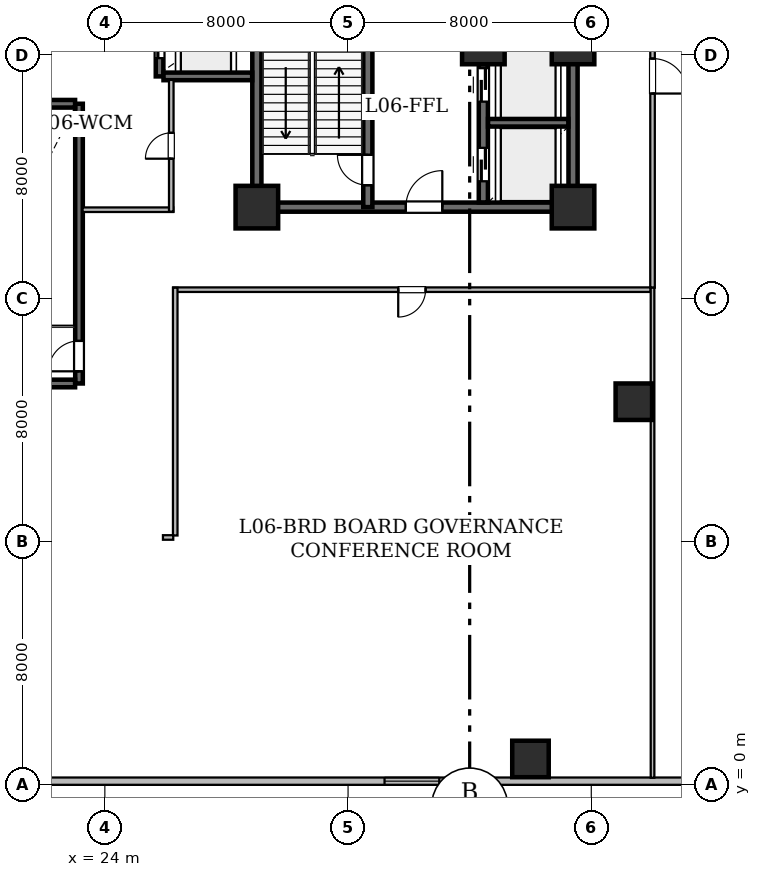
"""IFC4 building model, lengths in metres.
Left out: names, types, materials, properties, quantities, classifications, styles, units other than length and angle.
Written with IfcOpenShell. Run it as: python <this file> out.ifc"""

import sys

from ifc_helpers import new_model, si_unit, direction, frame, frame_2d, origin, origin_2d, place, context, subcontext, project, spatial, rectangle, hollow_rectangle, extrude, element, fill, save


model = new_model("IFC4")
c1 = context("Model", 3, precision=1e-05, world=origin(), true_north=direction((0.0, 1.0)))
c2 = subcontext(c1, "Body", "Model", "MODEL_VIEW")
j1 = project(units=[si_unit("LENGTHUNIT", "METRE"), si_unit("PLANEANGLEUNIT", "RADIAN")], contexts=[c1])
p1 = place(None, origin())
s1 = spatial("IfcSite", under=j1, at=p1, CompositionType="ELEMENT")
p2 = place(p1, origin())
s2 = spatial("IfcBuilding", under=s1, at=p2, CompositionType="ELEMENT")
p3 = place(p2, frame((0.0, 0.0, 28.8)))
s3 = spatial("IfcBuildingStorey", under=s2, at=p3, CompositionType="ELEMENT", Elevation=28.8)
for number, where, z_axis, x_axis in (
    (1, (29.0, 19.0, 0.0), (0.0, 0.0, 1.0), (1.0, 0.0, 0.0)),
    (2, (39.4, 19.0, 0.0), (0.0, 0.0, 1.0), (1.0, 0.0, 0.0)),
    (3, (36.45, 24.4, 0.0), (0.0, 0.0, 1.0), (1.0, 0.0, 0.0)),
    (4, (39.4, 24.4, 0.0), (0.0, 0.0, 1.0), (1.0, 0.0, 0.0)),
):
    element("IfcColumn", number, at=place(p3, frame(where, z_axis=z_axis, x_axis=x_axis)), inside=s3, PredefinedType="COLUMN", context=c2, shape_type="SweptSolid", body=[
        extrude(hollow_rectangle(XDim=1.4, YDim=1.4, WallThickness=0.07, at=origin_2d()), origin(), (0.0, 0.0, 1.0), 4.5),
    ])
for number, where, z_axis, x_axis in (
    (5, (38.0, 0.85, 0.0), (0.0, 0.0, 1.0), (1.0, 0.0, 0.0)),
    (6, (41.4, 12.6, 0.0), (0.0, 0.0, 1.0), (1.0, 0.0, 0.0)),
):
    element("IfcColumn", number, at=place(p3, frame(where, z_axis=z_axis, x_axis=x_axis)), inside=s3, PredefinedType="COLUMN", context=c2, shape_type="SweptSolid", body=[
        extrude(hollow_rectangle(XDim=1.2, YDim=1.2, WallThickness=0.06, at=origin_2d()), origin(), (0.0, 0.0, 1.0), 4.475),
    ])
p4 = place(p3, frame((50.275, 0.12, 0.0), z_axis=(0.0, 0.0, 1.0), x_axis=(-1.0, 0.0, 0.0)))
e7 = element("IfcWall", 7, at=p4, inside=s3, PredefinedType="STANDARD", context=c2, shape_type="SweptSolid", body=[
    extrude(rectangle(XDim=44.55, YDim=0.24, at=frame_2d((22.275, 0.0))), origin(), (0.0, 0.0, 1.0), 4.08),
])
p5 = place(p4, frame((15.275, 0.0, 0.85)))
e8 = element("IfcOpeningElement", 8, at=p5, cuts=e7, PredefinedType="OPENING", context=c2, shape_type="SweptSolid", body=[
    extrude(rectangle(XDim=1.8, YDim=0.92, at=frame_2d((0.9, 0.46))), frame((0.0, 0.13, 0.0), z_axis=(0.0, -1.0, 0.0), x_axis=(1.0, 0.0, 0.0)), (0.0, 0.0, 1.0), 0.26),
])
p6 = place(p3, frame((29.0, 19.0, 0.0), z_axis=(0.0, 0.0, 1.0), x_axis=(0.0, 1.0, 0.0)))
e9 = element("IfcWall", 9, at=p6, inside=s3, PredefinedType="SHEAR", context=c2, shape_type="SweptSolid", body=[
    extrude(rectangle(XDim=9.0, YDim=0.3, at=frame_2d((4.5, 0.0))), origin(), (0.0, 0.0, 1.0), 4.08),
])
p7 = place(p3, frame((29.0, 19.0, 0.0), z_axis=(0.0, 0.0, 1.0), x_axis=(1.0, 0.0, 0.0)))
e10 = element("IfcWall", 10, at=p7, inside=s3, PredefinedType="SHEAR", context=c2, shape_type="SweptSolid", body=[
    extrude(rectangle(XDim=10.4, YDim=0.3, at=frame_2d((5.2, 0.0))), origin(), (0.0, 0.0, 1.0), 4.08),
])
p8 = place(p7, frame((4.9, 0.0, 0.0)))
e11 = element("IfcOpeningElement", 11, at=p8, cuts=e10, PredefinedType="OPENING", context=c2, shape_type="SweptSolid", body=[
    extrude(rectangle(XDim=1.2, YDim=2.15, at=frame_2d((0.6, 1.075))), frame((0.0, 0.16, 0.0), z_axis=(0.0, -1.0, 0.0), x_axis=(1.0, 0.0, 0.0)), (0.0, 0.0, 1.0), 0.32),
])
p9 = place(p3, frame((39.4, 19.0, 0.0), z_axis=(0.0, 0.0, 1.0), x_axis=(0.0, 1.0, 0.0)))
e12 = element("IfcWall", 12, at=p9, inside=s3, PredefinedType="SHEAR", context=c2, shape_type="SweptSolid", body=[
    extrude(rectangle(XDim=5.4, YDim=0.3, at=frame_2d((2.7, 0.0))), origin(), (0.0, 0.0, 1.0), 4.08),
])
p10 = place(p3, frame((32.65, 19.0, 0.0), z_axis=(0.0, 0.0, 1.0), x_axis=(0.0, 1.0, 0.0)))
e13 = element("IfcWall", 13, at=p10, inside=s3, PredefinedType="SHEAR", context=c2, shape_type="SweptSolid", body=[
    extrude(rectangle(XDim=9.0, YDim=0.3, at=frame_2d((4.5, 0.0))), origin(), (0.0, 0.0, 1.0), 4.08),
])
p11 = place(p10, frame((0.72, 0.0, 0.0)))
e14 = element("IfcOpeningElement", 14, at=p11, cuts=e13, PredefinedType="OPENING", context=c2, shape_type="SweptSolid", body=[
    extrude(rectangle(XDim=1.0, YDim=2.15, at=frame_2d((0.5, 1.075))), frame((0.0, 0.16, 0.0), z_axis=(0.0, -1.0, 0.0), x_axis=(1.0, 0.0, 0.0)), (0.0, 0.0, 1.0), 0.32),
])
p12 = place(p3, frame((36.45, 19.154, 0.0), z_axis=(0.0, 0.0, 1.0), x_axis=(0.0, 1.0, 0.0)))
e15 = element("IfcWall", 15, at=p12, inside=s3, PredefinedType="SHEAR", context=c2, shape_type="SweptSolid", body=[
    extrude(rectangle(XDim=4.546, YDim=0.3, at=frame_2d((2.273, 0.0))), origin(), (0.0, 0.0, 1.0), 4.08),
])
p13 = place(p12, frame((0.696, 0.0, 0.0)))
e16 = element("IfcOpeningElement", 16, at=p13, cuts=e15, PredefinedType="OPENING", context=c2, shape_type="SweptSolid", body=[
    extrude(rectangle(XDim=1.1, YDim=2.15, at=frame_2d((0.55, 1.075))), frame((0.0, 0.16, 0.0), z_axis=(0.0, -1.0, 0.0), x_axis=(1.0, 0.0, 0.0)), (0.0, 0.0, 1.0), 0.32),
])
p14 = place(p12, frame((3.316, 0.0, 0.0)))
e17 = element("IfcOpeningElement", 17, at=p14, cuts=e15, PredefinedType="OPENING", context=c2, shape_type="SweptSolid", body=[
    extrude(rectangle(XDim=1.1, YDim=2.15, at=frame_2d((0.55, 1.075))), frame((0.0, 0.16, 0.0), z_axis=(0.0, -1.0, 0.0), x_axis=(1.0, 0.0, 0.0)), (0.0, 0.0, 1.0), 0.32),
])
p15 = place(p3, frame((36.604, 21.775, 0.0), z_axis=(0.0, 0.0, 1.0), x_axis=(1.0, 0.0, 0.0)))
e18 = element("IfcWall", 18, at=p15, inside=s3, PredefinedType="SHEAR", context=c2, shape_type="SweptSolid", body=[
    extrude(rectangle(XDim=2.642, YDim=0.25, at=frame_2d((1.321, 0.0))), origin(), (0.0, 0.0, 1.0), 4.08),
])
p16 = place(p3, frame((23.15, 13.2, 0.0), z_axis=(0.0, 0.0, 1.0), x_axis=(0.0, 1.0, 0.0)))
e19 = element("IfcWall", 19, at=p16, inside=s3, PredefinedType="SHEAR", context=c2, shape_type="SweptSolid", body=[
    extrude(rectangle(XDim=9.2, YDim=0.25, at=frame_2d((4.6, 0.0))), origin(), (0.0, 0.0, 1.0), 4.08),
])
p17 = place(p16, frame((0.4, 0.0, 0.0)))
e20 = element("IfcOpeningElement", 20, at=p17, cuts=e19, PredefinedType="OPENING", context=c2, shape_type="SweptSolid", body=[
    extrude(rectangle(XDim=1.0, YDim=2.15, at=frame_2d((0.5, 1.075))), frame((0.0, 0.135, 0.0), z_axis=(0.0, -1.0, 0.0), x_axis=(1.0, 0.0, 0.0)), (0.0, 0.0, 1.0), 0.27),
])
for number, where, z_axis, x_axis in (
    (21, (19.329, 13.2, 0.0), (0.0, 0.0, 1.0), (1.0, 0.0, 0.0)),
    (22, (19.329, 22.4, 0.0), (0.0, 0.0, 1.0), (1.0, 0.0, 0.0)),
):
    element("IfcWall", number, at=place(p3, frame(where, z_axis=z_axis, x_axis=x_axis)), inside=s3, PredefinedType="SHEAR", context=c2, shape_type="SweptSolid", body=[
        extrude(rectangle(XDim=3.692, YDim=0.25, at=frame_2d((1.846, 0.0))), origin(), (0.0, 0.0, 1.0), 4.08),
    ])
p18 = place(p3, frame((25.8, 23.3, 0.0), z_axis=(0.0, 0.0, 1.0), x_axis=(0.0, 1.0, 0.0)))
e23 = element("IfcWall", 23, at=p18, inside=s3, PredefinedType="SHEAR", context=c2, shape_type="SweptSolid", body=[
    extrude(rectangle(XDim=4.55, YDim=0.25, at=frame_2d((2.275, 0.0))), origin(), (0.0, 0.0, 1.0), 4.08),
])
p19 = place(p18, frame((0.6, 0.0, 0.0)))
e24 = element("IfcOpeningElement", 24, at=p19, cuts=e23, PredefinedType="OPENING", context=c2, shape_type="SweptSolid", body=[
    extrude(rectangle(XDim=1.1, YDim=2.15, at=frame_2d((0.55, 1.075))), frame((0.0, 0.135, 0.0), z_axis=(0.0, -1.0, 0.0), x_axis=(1.0, 0.0, 0.0)), (0.0, 0.0, 1.0), 0.27),
])
p20 = place(p18, frame((2.85, 0.0, 0.0)))
e25 = element("IfcOpeningElement", 25, at=p20, cuts=e23, PredefinedType="OPENING", context=c2, shape_type="SweptSolid", body=[
    extrude(rectangle(XDim=1.1, YDim=2.15, at=frame_2d((0.55, 1.075))), frame((0.0, 0.135, 0.0), z_axis=(0.0, -1.0, 0.0), x_axis=(1.0, 0.0, 0.0)), (0.0, 0.0, 1.0), 0.27),
])
p21 = place(p3, frame((25.929, 23.3, 0.0), z_axis=(0.0, 0.0, 1.0), x_axis=(1.0, 0.0, 0.0)))
e26 = element("IfcWall", 26, at=p21, inside=s3, PredefinedType="SHEAR", context=c2, shape_type="SweptSolid", body=[
    extrude(rectangle(XDim=2.917, YDim=0.25, at=frame_2d((1.458, 0.0))), origin(), (0.0, 0.0, 1.0), 4.08),
])
p22 = place(p3, frame((23.267, 18.915, 0.0), z_axis=(0.0, 0.0, 1.0), x_axis=(1.0, 0.0, 0.0)))
e27 = element("IfcWall", 27, at=p22, inside=s3, PredefinedType="STANDARD", context=c2, shape_type="SweptSolid", body=[
    extrude(rectangle(XDim=2.983, YDim=0.15, at=frame_2d((1.491, 0.0))), origin(), (0.0, 0.0, 1.0), 4.08),
])
p23 = place(p3, frame((26.185, 18.852, 0.0), z_axis=(0.0, 0.0, 1.0), x_axis=(0.0, 1.0, 0.0)))
e28 = element("IfcWall", 28, at=p23, inside=s3, PredefinedType="STANDARD", context=c2, shape_type="SweptSolid", body=[
    extrude(rectangle(XDim=4.331, YDim=0.15, at=frame_2d((2.166, 0.0))), origin(), (0.0, 0.0, 1.0), 4.08),
])
p24 = place(p23, frame((1.741, 0.0, 0.0)))
e29 = element("IfcOpeningElement", 29, at=p24, cuts=e28, PredefinedType="OPENING", context=c2, shape_type="SweptSolid", body=[
    extrude(rectangle(XDim=0.85, YDim=2.1, at=frame_2d((0.425, 1.05))), frame((0.0, 0.085, 0.0), z_axis=(0.0, -1.0, 0.0), x_axis=(1.0, 0.0, 0.0)), (0.0, 0.0, 1.0), 0.17),
])
p25 = place(p3, frame((42.015, 30.314, 0.0), z_axis=(0.0, 0.0, 1.0), x_axis=(0.0, -1.0, 0.0)))
e30 = element("IfcWall", 30, at=p25, inside=s3, PredefinedType="STANDARD", context=c2, shape_type="SweptSolid", body=[
    extrude(rectangle(XDim=13.964, YDim=0.15, at=frame_2d((6.982, 0.0))), origin(), (0.0, 0.0, 1.0), 2.67),
])
p26 = place(p25, frame((6.428, 0.0, 0.0)))
e31 = element("IfcOpeningElement", 31, at=p26, cuts=e30, PredefinedType="OPENING", context=c2, shape_type="SweptSolid", body=[
    extrude(rectangle(XDim=1.15, YDim=2.2, at=frame_2d((0.575, 1.1))), frame((0.0, 0.085, 0.0), z_axis=(0.0, -1.0, 0.0), x_axis=(1.0, 0.0, 0.0)), (0.0, 0.0, 1.0), 0.17),
])
p27 = place(p3, frame((41.95, 16.285, 0.0), z_axis=(0.0, 0.0, 1.0), x_axis=(-1.0, 0.0, 0.0)))
e32 = element("IfcWall", 32, at=p27, inside=s3, PredefinedType="STANDARD", context=c2, shape_type="SweptSolid", body=[
    extrude(rectangle(XDim=15.7, YDim=0.15, at=frame_2d((7.85, 0.0))), origin(), (0.0, 0.0, 1.0), 2.67),
])
p28 = place(p27, frame((7.4, 0.0, 0.0)))
e33 = element("IfcOpeningElement", 33, at=p28, cuts=e32, PredefinedType="OPENING", context=c2, shape_type="SweptSolid", body=[
    extrude(rectangle(XDim=0.9, YDim=2.1, at=frame_2d((0.45, 1.05))), frame((0.0, 0.085, 0.0), z_axis=(0.0, -1.0, 0.0), x_axis=(1.0, 0.0, 0.0)), (0.0, 0.0, 1.0), 0.17),
])
p29 = place(p3, frame((26.315, 16.35, 0.0), z_axis=(0.0, 0.0, 1.0), x_axis=(0.0, -1.0, 0.0)))
e34 = element("IfcWall", 34, at=p29, inside=s3, PredefinedType="STANDARD", context=c2, shape_type="SweptSolid", body=[
    extrude(rectangle(XDim=8.15, YDim=0.15, at=frame_2d((4.075, 0.0))), origin(), (0.0, 0.0, 1.0), 2.67),
])
p30 = place(p3, frame((26.25, 8.135, 0.0), z_axis=(0.0, 0.0, 1.0), x_axis=(-1.0, 0.0, 0.0)))
e35 = element("IfcWall", 35, at=p30, inside=s3, PredefinedType="STANDARD", context=c2, shape_type="SweptSolid", body=[
    extrude(rectangle(XDim=0.339, YDim=0.15, at=frame_2d((0.169, 0.0))), origin(), (0.0, 0.0, 1.0), 4.08),
])
p31 = place(p3, frame((42.015, 0.232, 0.0), z_axis=(0.0, 0.0, 1.0), x_axis=(0.0, 1.0, 0.0)))
e36 = element("IfcWall", 36, at=p31, inside=s3, PredefinedType="PARTITIONING", context=c2, shape_type="SweptSolid", body=[
    extrude(rectangle(XDim=16.118, YDim=0.12, at=frame_2d((8.059, 0.0))), origin(), (0.0, 0.0, 1.0), 2.67),
])
p32 = place(p5, origin())
e37 = element("IfcWindow", 37, at=p32, inside=s3, PartitioningType="SINGLE_PANEL", PredefinedType="WINDOW", context=c2, shape_type="SweptSolid", body=[
    extrude(rectangle(XDim=1.8, YDim=0.92, at=frame_2d((0.9, 0.46))), frame((0.0, 0.03, 0.0), z_axis=(0.0, -1.0, 0.0), x_axis=(1.0, 0.0, 0.0)), (0.0, 0.0, 1.0), 0.06),
])
fill(e8, e37)
p33 = place(p11, origin())
e38 = element("IfcDoor", 38, at=p33, inside=s3, OperationType="SINGLE_SWING_RIGHT", PredefinedType="DOOR", context=c2, shape_type="SweptSolid", body=[
    extrude(rectangle(XDim=1.0, YDim=2.15, at=frame_2d((0.5, 1.075))), frame((0.0, 0.025, 0.0), z_axis=(0.0, -1.0, 0.0), x_axis=(1.0, 0.0, 0.0)), (0.0, 0.0, 1.0), 0.05),
])
fill(e14, e38)
p34 = place(p8, origin())
e39 = element("IfcDoor", 39, at=p34, inside=s3, OperationType="SINGLE_SWING_RIGHT", PredefinedType="DOOR", context=c2, shape_type="SweptSolid", body=[
    extrude(rectangle(XDim=1.2, YDim=2.15, at=frame_2d((0.6, 1.075))), frame((0.0, 0.025, 0.0), z_axis=(0.0, -1.0, 0.0), x_axis=(1.0, 0.0, 0.0)), (0.0, 0.0, 1.0), 0.05),
])
fill(e11, e39)
p35 = place(p13, origin())
e40 = element("IfcDoor", 40, at=p35, inside=s3, OperationType="SLIDING_TO_LEFT", PredefinedType="DOOR", context=c2, shape_type="SweptSolid", body=[
    extrude(rectangle(XDim=1.1, YDim=2.15, at=frame_2d((0.55, 1.075))), frame((0.0, 0.025, 0.0), z_axis=(0.0, -1.0, 0.0), x_axis=(1.0, 0.0, 0.0)), (0.0, 0.0, 1.0), 0.05),
])
fill(e16, e40)
p36 = place(p14, origin())
e41 = element("IfcDoor", 41, at=p36, inside=s3, OperationType="SLIDING_TO_LEFT", PredefinedType="DOOR", context=c2, shape_type="SweptSolid", body=[
    extrude(rectangle(XDim=1.1, YDim=2.15, at=frame_2d((0.55, 1.075))), frame((0.0, 0.025, 0.0), z_axis=(0.0, -1.0, 0.0), x_axis=(1.0, 0.0, 0.0)), (0.0, 0.0, 1.0), 0.05),
])
fill(e17, e41)
p37 = place(p17, origin())
e42 = element("IfcDoor", 42, at=p37, inside=s3, OperationType="SINGLE_SWING_LEFT", PredefinedType="DOOR", context=c2, shape_type="SweptSolid", body=[
    extrude(rectangle(XDim=1.0, YDim=2.15, at=frame_2d((0.5, 1.075))), frame((0.0, 0.025, 0.0), z_axis=(0.0, -1.0, 0.0), x_axis=(1.0, 0.0, 0.0)), (0.0, 0.0, 1.0), 0.05),
])
fill(e20, e42)
p38 = place(p19, origin())
e43 = element("IfcDoor", 43, at=p38, inside=s3, OperationType="SLIDING_TO_LEFT", PredefinedType="DOOR", context=c2, shape_type="SweptSolid", body=[
    extrude(rectangle(XDim=1.1, YDim=2.15, at=frame_2d((0.55, 1.075))), frame((0.0, 0.025, 0.0), z_axis=(0.0, -1.0, 0.0), x_axis=(1.0, 0.0, 0.0)), (0.0, 0.0, 1.0), 0.05),
])
fill(e24, e43)
p39 = place(p24, origin())
e44 = element("IfcDoor", 44, at=p39, inside=s3, OperationType="SINGLE_SWING_LEFT", PredefinedType="DOOR", context=c2, shape_type="SweptSolid", body=[
    extrude(rectangle(XDim=0.85, YDim=2.1, at=frame_2d((0.425, 1.05))), frame((0.0, 0.025, 0.0), z_axis=(0.0, -1.0, 0.0), x_axis=(1.0, 0.0, 0.0)), (0.0, 0.0, 1.0), 0.05),
])
fill(e29, e44)
p40 = place(p26, origin())
e45 = element("IfcDoor", 45, at=p40, inside=s3, OperationType="SINGLE_SWING_RIGHT", PredefinedType="DOOR", context=c2, shape_type="SweptSolid", body=[
    extrude(rectangle(XDim=1.15, YDim=2.2, at=frame_2d((0.575, 1.1))), frame((0.0, 0.025, 0.0), z_axis=(0.0, -1.0, 0.0), x_axis=(1.0, 0.0, 0.0)), (0.0, 0.0, 1.0), 0.05),
])
fill(e31, e45)
p41 = place(p28, origin())
e46 = element("IfcDoor", 46, at=p41, inside=s3, OperationType="SINGLE_SWING_RIGHT", PredefinedType="DOOR", context=c2, shape_type="SweptSolid", body=[
    extrude(rectangle(XDim=0.9, YDim=2.1, at=frame_2d((0.45, 1.05))), frame((0.0, 0.025, 0.0), z_axis=(0.0, -1.0, 0.0), x_axis=(1.0, 0.0, 0.0)), (0.0, 0.0, 1.0), 0.05),
])
fill(e33, e46)
save(model, sys.argv[1])
